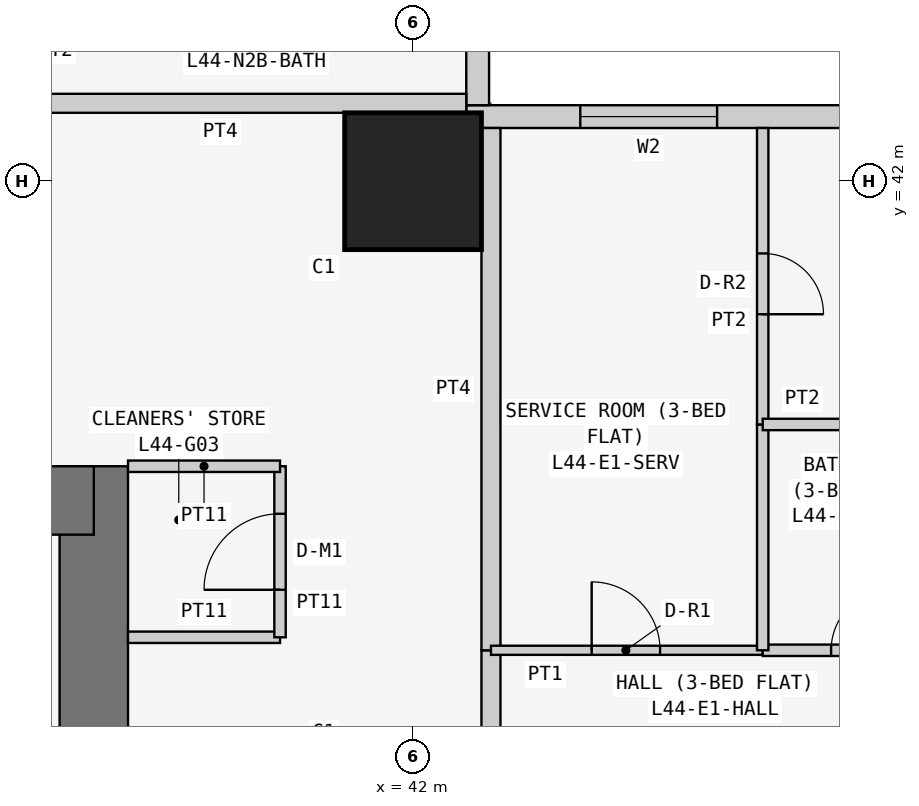
"""IFC4 building model, lengths in metres.
Left out: names, types, materials, properties, quantities, classifications, styles, units other than length and angle.
Written with IfcOpenShell. Run it as: python <this file> out.ifc"""

import sys

from ifc_helpers import new_model, si_unit, direction, frame, frame_2d, origin, origin_2d, place, context, subcontext, project, spatial, rectangle, extrude, element, fill, save


model = new_model("IFC4")
c1 = context("Model", 3, precision=1e-05, world=origin(), true_north=direction((0.0, 1.0)))
c2 = subcontext(c1, "Body", "Model", "MODEL_VIEW")
j1 = project(units=[si_unit("LENGTHUNIT", "METRE"), si_unit("PLANEANGLEUNIT", "RADIAN")], contexts=[c1])
p1 = place(None, origin())
s1 = spatial("IfcSite", under=j1, at=p1, CompositionType="ELEMENT")
p2 = place(p1, origin())
s2 = spatial("IfcBuilding", under=s1, at=p2, CompositionType="ELEMENT")
p3 = place(p2, frame((0.0, 0.0, 170.1)))
s3 = spatial("IfcBuildingStorey", under=s2, at=p3, CompositionType="ELEMENT", Elevation=170.1)
p4 = place(p3, frame((42.0, 42.0, 0.0), z_axis=(0.0, 0.0, 1.0), x_axis=(1.0, 0.0, 0.0)))
e1 = element("IfcColumn", 1, at=p4, inside=s3, PredefinedType="COLUMN", context=c2, shape_type="SweptSolid", body=[
    extrude(rectangle(XDim=1.8, YDim=1.8, at=origin_2d()), origin(), (0.0, 0.0, 1.0), 3.6),
])
p5 = place(p3, frame((37.8, 21.0, 0.0), z_axis=(0.0, 0.0, 1.0), x_axis=(0.0, 1.0, 0.0)))
e2 = element("IfcWall", 2, at=p5, inside=s3, PredefinedType="SHEAR", context=c2, shape_type="SweptSolid", body=[
    extrude(rectangle(XDim=17.25, YDim=0.9, at=frame_2d((8.625, 0.0))), origin(), (0.0, 0.0, 1.0), 3.6),
])
p6 = place(p5, frame((5.2, 0.0, 0.0)))
e3 = element("IfcOpeningElement", 3, at=p6, cuts=e2, PredefinedType="OPENING", context=c2, shape_type="SweptSolid", body=[
    extrude(rectangle(XDim=1.2, YDim=2.1, at=frame_2d((0.6, 1.05))), frame((0.0, 0.46, 0.0), z_axis=(0.0, -1.0, 0.0), x_axis=(1.0, 0.0, 0.0)), (0.0, 0.0, 1.0), 0.92),
])
p7 = place(p3, frame((37.8, 37.8, 0.0), z_axis=(0.0, 0.0, 1.0), x_axis=(-1.0, 0.0, 0.0)))
e4 = element("IfcWall", 4, at=p7, inside=s3, PredefinedType="SHEAR", context=c2, shape_type="SweptSolid", body=[
    extrude(rectangle(XDim=17.25, YDim=0.9, at=frame_2d((8.625, 0.0))), origin(), (0.0, 0.0, 1.0), 3.6),
])
p8 = place(p3, frame((58.4, 42.85, 0.0), z_axis=(0.0, 0.0, 1.0), x_axis=(-1.0, 0.0, 0.0)))
e5 = element("IfcWall", 5, at=p8, inside=s3, PredefinedType="SOLIDWALL", context=c2, shape_type="SweptSolid", body=[
    extrude(rectangle(XDim=15.7, YDim=0.3, at=frame_2d((7.85, 0.0))), origin(), (0.0, 0.0, 1.0), 3.45),
])
p9 = place(p8, frame((12.4, 0.0, 0.9)))
e6 = element("IfcOpeningElement", 6, at=p9, cuts=e5, PredefinedType="OPENING", context=c2, shape_type="SweptSolid", body=[
    extrude(rectangle(XDim=1.8, YDim=1.5, at=frame_2d((0.9, 0.75))), frame((0.0, 0.16, 0.0), z_axis=(0.0, -1.0, 0.0), x_axis=(1.0, 0.0, 0.0)), (0.0, 0.0, 1.0), 0.32),
])
p10 = place(p8, frame((9.55, 0.0, 1.5)))
e7 = element("IfcOpeningElement", 7, at=p10, cuts=e5, PredefinedType="OPENING", context=c2, shape_type="SweptSolid", body=[
    extrude(rectangle(XDim=0.9, YDim=0.7, at=frame_2d((0.45, 0.35))), frame((0.0, 0.16, 0.0), z_axis=(0.0, -1.0, 0.0), x_axis=(1.0, 0.0, 0.0)), (0.0, 0.0, 1.0), 0.32),
])
p11 = place(p8, frame((5.1, 0.0, 0.9)))
e8 = element("IfcOpeningElement", 8, at=p11, cuts=e5, PredefinedType="OPENING", context=c2, shape_type="SweptSolid", body=[
    extrude(rectangle(XDim=1.8, YDim=1.5, at=frame_2d((0.9, 0.75))), frame((0.0, 0.16, 0.0), z_axis=(0.0, -1.0, 0.0), x_axis=(1.0, 0.0, 0.0)), (0.0, 0.0, 1.0), 0.32),
])
p12 = place(p8, frame((2.0, 0.0, 0.0)))
e9 = element("IfcOpeningElement", 9, at=p12, cuts=e5, PredefinedType="OPENING", context=c2, shape_type="SweptSolid", body=[
    extrude(rectangle(XDim=0.9, YDim=2.4, at=frame_2d((0.45, 1.2))), frame((0.0, 0.16, 0.0), z_axis=(0.0, -1.0, 0.0), x_axis=(1.0, 0.0, 0.0)), (0.0, 0.0, 1.0), 0.32),
])
p13 = place(p8, frame((0.7, 0.0, 0.9)))
e10 = element("IfcOpeningElement", 10, at=p13, cuts=e5, PredefinedType="OPENING", context=c2, shape_type="SweptSolid", body=[
    extrude(rectangle(XDim=1.2, YDim=1.5, at=frame_2d((0.6, 0.75))), frame((0.0, 0.16, 0.0), z_axis=(0.0, -1.0, 0.0), x_axis=(1.0, 0.0, 0.0)), (0.0, 0.0, 1.0), 0.32),
])
p14 = place(p3, frame((42.85, 43.0, 0.0), z_axis=(0.0, 0.0, 1.0), x_axis=(0.0, 1.0, 0.0)))
e11 = element("IfcWall", 11, at=p14, inside=s3, PredefinedType="SOLIDWALL", context=c2, shape_type="SweptSolid", body=[
    extrude(rectangle(XDim=7.0, YDim=0.3, at=frame_2d((3.5, 0.0))), origin(), (0.0, 0.0, 1.0), 3.45),
])
p15 = place(p14, frame((1.5, 0.0, 0.9)))
e12 = element("IfcOpeningElement", 12, at=p15, cuts=e11, PredefinedType="OPENING", context=c2, shape_type="SweptSolid", body=[
    extrude(rectangle(XDim=2.4, YDim=1.5, at=frame_2d((1.2, 0.75))), frame((0.0, 0.16, 0.0), z_axis=(0.0, -1.0, 0.0), x_axis=(1.0, 0.0, 0.0)), (0.0, 0.0, 1.0), 0.32),
])
p16 = place(p14, frame((5.05, 0.0, 0.9)))
e13 = element("IfcOpeningElement", 13, at=p16, cuts=e11, PredefinedType="OPENING", context=c2, shape_type="SweptSolid", body=[
    extrude(rectangle(XDim=1.2, YDim=1.5, at=frame_2d((0.6, 0.75))), frame((0.0, 0.16, 0.0), z_axis=(0.0, -1.0, 0.0), x_axis=(1.0, 0.0, 0.0)), (0.0, 0.0, 1.0), 0.32),
])
p17 = place(p3, frame((38.25, 36.0, 0.0), z_axis=(0.0, 0.0, 1.0), x_axis=(1.0, 0.0, 0.0)))
e14 = element("IfcWall", 14, at=p17, inside=s3, PredefinedType="PARTITIONING", context=c2, shape_type="SweptSolid", body=[
    extrude(rectangle(XDim=2.0, YDim=0.15, at=frame_2d((1.0, 0.0))), origin(), (0.0, 0.0, 1.0), 3.45),
])
p18 = place(p3, frame((40.25, 36.0, 0.0), z_axis=(0.0, 0.0, 1.0), x_axis=(0.0, 1.0, 0.0)))
e15 = element("IfcWall", 15, at=p18, inside=s3, PredefinedType="PARTITIONING", context=c2, shape_type="SweptSolid", body=[
    extrude(rectangle(XDim=2.25, YDim=0.15, at=frame_2d((1.125, 0.0))), origin(), (0.0, 0.0, 1.0), 3.45),
])
p19 = place(p18, frame((0.625, 0.0, 0.0)))
e16 = element("IfcOpeningElement", 16, at=p19, cuts=e15, PredefinedType="OPENING", context=c2, shape_type="SweptSolid", body=[
    extrude(rectangle(XDim=1.0, YDim=2.1, at=frame_2d((0.5, 1.05))), frame((0.0, 0.085, 0.0), z_axis=(0.0, -1.0, 0.0), x_axis=(1.0, 0.0, 0.0)), (0.0, 0.0, 1.0), 0.17),
])
p20 = place(p3, frame((40.25, 38.25, 0.0), z_axis=(0.0, 0.0, 1.0), x_axis=(-1.0, 0.0, 0.0)))
e17 = element("IfcWall", 17, at=p20, inside=s3, PredefinedType="PARTITIONING", context=c2, shape_type="SweptSolid", body=[
    extrude(rectangle(XDim=2.0, YDim=0.15, at=frame_2d((1.0, 0.0))), origin(), (0.0, 0.0, 1.0), 3.45),
])
p21 = place(p3, frame((36.229, 43.025, 0.0), z_axis=(0.0, 0.0, 1.0), x_axis=(1.0, 0.0, 0.0)))
e18 = element("IfcWall", 18, at=p21, inside=s3, PredefinedType="PARTITIONING", context=c2, shape_type="SweptSolid", body=[
    extrude(rectangle(XDim=6.471, YDim=0.25, at=frame_2d((3.235, 0.0))), origin(), (0.0, 0.0, 1.0), 3.45),
])
p22 = place(p3, frame((43.025, 35.829, 0.0), z_axis=(0.0, 0.0, 1.0), x_axis=(0.0, -1.0, 0.0)))
e19 = element("IfcWall", 19, at=p22, inside=s3, PredefinedType="PARTITIONING", context=c2, shape_type="SweptSolid", body=[
    extrude(rectangle(XDim=1.2, YDim=0.25, at=frame_2d((0.6, 0.0))), origin(), (0.0, 0.0, 1.0), 3.45),
])
p23 = place(p3, frame((43.025, 42.7, 0.0), z_axis=(0.0, 0.0, 1.0), x_axis=(0.0, -1.0, 0.0)))
e20 = element("IfcWall", 20, at=p23, inside=s3, PredefinedType="PARTITIONING", context=c2, shape_type="SweptSolid", body=[
    extrude(rectangle(XDim=6.871, YDim=0.25, at=frame_2d((3.436, 0.0))), origin(), (0.0, 0.0, 1.0), 3.45),
])
p24 = place(p3, frame((46.6, 35.829, 0.0), z_axis=(0.0, 0.0, 1.0), x_axis=(-1.0, 0.0, 0.0)))
e21 = element("IfcWall", 21, at=p24, inside=s3, PredefinedType="PARTITIONING", context=c2, shape_type="SweptSolid", body=[
    extrude(rectangle(XDim=3.575, YDim=0.12, at=frame_2d((1.788, 0.0))), origin(), (0.0, 0.0, 1.0), 3.45),
])
p25 = place(p24, frame((1.35, 0.0, 0.0)))
e22 = element("IfcOpeningElement", 22, at=p25, cuts=e21, PredefinedType="OPENING", context=c2, shape_type="SweptSolid", body=[
    extrude(rectangle(XDim=0.9, YDim=2.1, at=frame_2d((0.45, 1.05))), frame((0.0, 0.07, 0.0), z_axis=(0.0, -1.0, 0.0), x_axis=(1.0, 0.0, 0.0)), (0.0, 0.0, 1.0), 0.14),
])
p26 = place(p3, frame((49.2, 35.829, 0.0), z_axis=(0.0, 0.0, 1.0), x_axis=(-1.0, 0.0, 0.0)))
e23 = element("IfcWall", 23, at=p26, inside=s3, PredefinedType="PARTITIONING", context=c2, shape_type="SweptSolid", body=[
    extrude(rectangle(XDim=2.6, YDim=0.15, at=frame_2d((1.3, 0.0))), origin(), (0.0, 0.0, 1.0), 3.45),
])
p27 = place(p26, frame((0.9, 0.0, 0.0)))
e24 = element("IfcOpeningElement", 24, at=p27, cuts=e23, PredefinedType="OPENING", context=c2, shape_type="SweptSolid", body=[
    extrude(rectangle(XDim=0.8, YDim=2.1, at=frame_2d((0.4, 1.05))), frame((0.0, 0.085, 0.0), z_axis=(0.0, -1.0, 0.0), x_axis=(1.0, 0.0, 0.0)), (0.0, 0.0, 1.0), 0.17),
])
p28 = place(p3, frame((46.6, 35.829, 0.0), z_axis=(0.0, 0.0, 1.0), x_axis=(0.0, 1.0, 0.0)))
e25 = element("IfcWall", 25, at=p28, inside=s3, PredefinedType="PARTITIONING", context=c2, shape_type="SweptSolid", body=[
    extrude(rectangle(XDim=2.971, YDim=0.15, at=frame_2d((1.485, 0.0))), origin(), (0.0, 0.0, 1.0), 3.45),
])
p29 = place(p3, frame((46.6, 38.8, 0.0), z_axis=(0.0, 0.0, 1.0), x_axis=(0.0, 1.0, 0.0)))
e26 = element("IfcWall", 26, at=p29, inside=s3, PredefinedType="PARTITIONING", context=c2, shape_type="SweptSolid", body=[
    extrude(rectangle(XDim=3.9, YDim=0.15, at=frame_2d((1.95, 0.0))), origin(), (0.0, 0.0, 1.0), 3.45),
])
p30 = place(p29, frame((1.45, 0.0, 0.0)))
e27 = element("IfcOpeningElement", 27, at=p30, cuts=e26, PredefinedType="OPENING", context=c2, shape_type="SweptSolid", body=[
    extrude(rectangle(XDim=0.8, YDim=2.1, at=frame_2d((0.4, 1.05))), frame((0.0, 0.085, 0.0), z_axis=(0.0, -1.0, 0.0), x_axis=(1.0, 0.0, 0.0)), (0.0, 0.0, 1.0), 0.17),
])
p31 = place(p3, frame((49.2, 38.8, 0.0), z_axis=(0.0, 0.0, 1.0), x_axis=(-1.0, 0.0, 0.0)))
e28 = element("IfcWall", 28, at=p31, inside=s3, PredefinedType="PARTITIONING", context=c2, shape_type="SweptSolid", body=[
    extrude(rectangle(XDim=2.6, YDim=0.15, at=frame_2d((1.3, 0.0))), origin(), (0.0, 0.0, 1.0), 3.45),
])
p32 = place(p9, origin())
e29 = element("IfcWindow", 29, at=p32, inside=s3, PartitioningType="SINGLE_PANEL", PredefinedType="WINDOW", context=c2, shape_type="SweptSolid", body=[
    extrude(rectangle(XDim=1.8, YDim=1.5, at=frame_2d((0.9, 0.75))), frame((0.0, 0.03, 0.0), z_axis=(0.0, -1.0, 0.0), x_axis=(1.0, 0.0, 0.0)), (0.0, 0.0, 1.0), 0.06),
])
fill(e6, e29)
p33 = place(p19, origin())
e30 = element("IfcDoor", 30, at=p33, inside=s3, OperationType="SINGLE_SWING_LEFT", PredefinedType="DOOR", context=c2, shape_type="SweptSolid", body=[
    extrude(rectangle(XDim=1.0, YDim=2.1, at=frame_2d((0.5, 1.05))), frame((0.0, 0.025, 0.0), z_axis=(0.0, -1.0, 0.0), x_axis=(1.0, 0.0, 0.0)), (0.0, 0.0, 1.0), 0.05),
])
fill(e16, e30)
p34 = place(p25, frame((0.9, 0.0, 0.0), z_axis=(0.0, 0.0, 1.0), x_axis=(-1.0, 0.0, 0.0)))
e31 = element("IfcDoor", 31, at=p34, inside=s3, OperationType="SINGLE_SWING_LEFT", PredefinedType="DOOR", context=c2, shape_type="SweptSolid", body=[
    extrude(rectangle(XDim=0.9, YDim=2.1, at=frame_2d((0.45, 1.05))), frame((0.0, 0.025, 0.0), z_axis=(0.0, -1.0, 0.0), x_axis=(1.0, 0.0, 0.0)), (0.0, 0.0, 1.0), 0.05),
])
fill(e22, e31)
p35 = place(p30, frame((0.8, 0.0, 0.0), z_axis=(0.0, 0.0, 1.0), x_axis=(-1.0, 0.0, 0.0)))
e32 = element("IfcDoor", 32, at=p35, inside=s3, OperationType="SINGLE_SWING_RIGHT", PredefinedType="DOOR", context=c2, shape_type="SweptSolid", body=[
    extrude(rectangle(XDim=0.8, YDim=2.1, at=frame_2d((0.4, 1.05))), frame((0.0, 0.025, 0.0), z_axis=(0.0, -1.0, 0.0), x_axis=(1.0, 0.0, 0.0)), (0.0, 0.0, 1.0), 0.05),
])
fill(e27, e32)
p36 = place(p27, frame((0.8, 0.0, 0.0), z_axis=(0.0, 0.0, 1.0), x_axis=(-1.0, 0.0, 0.0)))
e33 = element("IfcDoor", 33, at=p36, inside=s3, OperationType="SINGLE_SWING_RIGHT", PredefinedType="DOOR", context=c2, shape_type="SweptSolid", body=[
    extrude(rectangle(XDim=0.8, YDim=2.1, at=frame_2d((0.4, 1.05))), frame((0.0, 0.025, 0.0), z_axis=(0.0, -1.0, 0.0), x_axis=(1.0, 0.0, 0.0)), (0.0, 0.0, 1.0), 0.05),
])
fill(e24, e33)
save(model, sys.argv[1])
